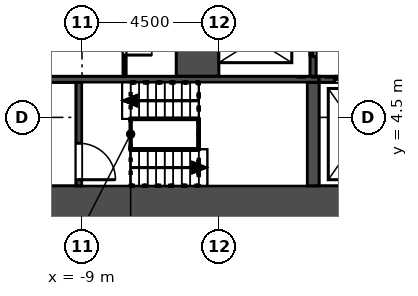
"""IFC4 building model, lengths in metres.
Left out: names, types, materials, properties, quantities, classifications, styles, units other than length and angle.
Written with IfcOpenShell. Run it as: python <this file> out.ifc"""

import sys

from ifc_helpers import new_model, si_unit, direction, frame, frame_2d, origin, place, context, subcontext, project, spatial, rectangle, extrude, element, fill, save


model = new_model("IFC4")
c1 = context("Model", 3, precision=1e-05, world=origin(), true_north=direction((0.0, 1.0)))
c2 = subcontext(c1, "Body", "Model", "MODEL_VIEW")
j1 = project(units=[si_unit("LENGTHUNIT", "METRE"), si_unit("PLANEANGLEUNIT", "RADIAN")], contexts=[c1])
p1 = place(None, origin())
s1 = spatial("IfcSite", under=j1, at=p1, CompositionType="ELEMENT")
p2 = place(p1, origin())
s2 = spatial("IfcBuilding", under=s1, at=p2, CompositionType="ELEMENT")
p3 = place(p2, frame((0.0, 0.0, -14.0)))
s3 = spatial("IfcBuildingStorey", under=s2, at=p3, CompositionType="ELEMENT", Elevation=-14.0)
p4 = place(p3, frame((-14.0, 1.55, 0.0), z_axis=(0.0, 0.0, 1.0), x_axis=(1.0, 0.0, 0.0)))
e1 = element("IfcWall", 1, at=p4, inside=s3, PredefinedType="SHEAR", context=c2, shape_type="SweptSolid", body=[
    extrude(rectangle(XDim=28.0, YDim=1.4, at=frame_2d((14.0, 0.0))), origin(), (0.0, 0.0, 1.0), 6.0),
])
p5 = place(p3, frame((-1.4, 5.85, 0.0), z_axis=(0.0, 0.0, 1.0), x_axis=(0.0, 1.0, 0.0)))
e2 = element("IfcWall", 2, at=p5, inside=s3, PredefinedType="SOLIDWALL", context=c2, shape_type="SweptSolid", body=[
    extrude(rectangle(XDim=11.75, YDim=0.2, at=frame_2d((5.875, 0.0))), origin(), (0.0, 0.0, 1.0), 5.65),
])
p6 = place(p5, frame((0.65, 0.0, 0.0)))
e3 = element("IfcOpeningElement", 3, at=p6, cuts=e2, PredefinedType="OPENING", context=c2, shape_type="SweptSolid", body=[
    extrude(rectangle(XDim=1.1, YDim=2.1, at=frame_2d((0.55, 1.05))), frame((0.0, 0.11, 0.0), z_axis=(0.0, -1.0, 0.0), x_axis=(1.0, 0.0, 0.0)), (0.0, 0.0, 1.0), 0.22),
])
p7 = place(p5, frame((3.3, 0.0, 0.0)))
e4 = element("IfcOpeningElement", 4, at=p7, cuts=e2, PredefinedType="OPENING", context=c2, shape_type="SweptSolid", body=[
    extrude(rectangle(XDim=1.0, YDim=2.1, at=frame_2d((0.5, 1.05))), frame((0.0, 0.11, 0.0), z_axis=(0.0, -1.0, 0.0), x_axis=(1.0, 0.0, 0.0)), (0.0, 0.0, 1.0), 0.22),
])
p8 = place(p5, frame((5.9, 0.0, 0.0)))
e5 = element("IfcOpeningElement", 5, at=p8, cuts=e2, PredefinedType="OPENING", context=c2, shape_type="SweptSolid", body=[
    extrude(rectangle(XDim=1.0, YDim=2.1, at=frame_2d((0.5, 1.05))), frame((0.0, 0.11, 0.0), z_axis=(0.0, -1.0, 0.0), x_axis=(1.0, 0.0, 0.0)), (0.0, 0.0, 1.0), 0.22),
])
p9 = place(p5, frame((8.5, 0.0, 0.0)))
e6 = element("IfcOpeningElement", 6, at=p9, cuts=e2, PredefinedType="OPENING", context=c2, shape_type="SweptSolid", body=[
    extrude(rectangle(XDim=1.0, YDim=2.1, at=frame_2d((0.5, 1.05))), frame((0.0, 0.11, 0.0), z_axis=(0.0, -1.0, 0.0), x_axis=(1.0, 0.0, 0.0)), (0.0, 0.0, 1.0), 0.22),
])
p10 = place(p3, frame((-5.2, 5.85, 0.0), z_axis=(0.0, 0.0, 1.0), x_axis=(0.0, 1.0, 0.0)))
e7 = element("IfcWall", 7, at=p10, inside=s3, PredefinedType="SOLIDWALL", context=c2, shape_type="SweptSolid", body=[
    extrude(rectangle(XDim=2.4, YDim=1.4, at=frame_2d((1.2, 0.0))), origin(), (0.0, 0.0, 1.0), 5.65),
])
p11 = place(p3, frame((-12.6, 5.75, 0.0), z_axis=(0.0, 0.0, 1.0), x_axis=(1.0, 0.0, 0.0)))
e8 = element("IfcWall", 8, at=p11, inside=s3, PredefinedType="SOLIDWALL", context=c2, shape_type="SweptSolid", body=[
    extrude(rectangle(XDim=11.4, YDim=0.2, at=frame_2d((5.7, 0.0))), origin(), (0.0, 0.0, 1.0), 5.65),
])
p12 = place(p3, frame((-1.2, 5.75, 0.0), z_axis=(0.0, 0.0, 1.0), x_axis=(1.0, 0.0, 0.0)))
e9 = element("IfcWall", 9, at=p12, inside=s3, PredefinedType="SOLIDWALL", context=c2, shape_type="SweptSolid", body=[
    extrude(rectangle(XDim=2.4, YDim=0.2, at=frame_2d((1.2, 0.0))), origin(), (0.0, 0.0, 1.0), 5.65),
])
p13 = place(p12, frame((0.5, 0.0, 0.0)))
e10 = element("IfcOpeningElement", 10, at=p13, cuts=e9, PredefinedType="OPENING", context=c2, shape_type="SweptSolid", body=[
    extrude(rectangle(XDim=1.4, YDim=2.1, at=frame_2d((0.7, 1.05))), frame((0.0, 0.11, 0.0), z_axis=(0.0, -1.0, 0.0), x_axis=(1.0, 0.0, 0.0)), (0.0, 0.0, 1.0), 0.22),
])
p14 = place(p3, frame((-9.1, 2.25, 0.0), z_axis=(0.0, 0.0, 1.0), x_axis=(0.0, 1.0, 0.0)))
e11 = element("IfcWall", 11, at=p14, inside=s3, PredefinedType="SOLIDWALL", context=c2, shape_type="SweptSolid", body=[
    extrude(rectangle(XDim=3.4, YDim=0.2, at=frame_2d((1.7, 0.0))), origin(), (0.0, 0.0, 1.0), 5.65),
])
p15 = place(p14, frame((0.2, 0.0, 0.0)))
e12 = element("IfcOpeningElement", 12, at=p15, cuts=e11, PredefinedType="OPENING", context=c2, shape_type="SweptSolid", body=[
    extrude(rectangle(XDim=1.2, YDim=2.1, at=frame_2d((0.6, 1.05))), frame((0.0, 0.11, 0.0), z_axis=(0.0, -1.0, 0.0), x_axis=(1.0, 0.0, 0.0)), (0.0, 0.0, 1.0), 0.22),
])
p16 = place(p3, frame((-1.4, 2.25, 0.0), z_axis=(0.0, 0.0, 1.0), x_axis=(0.0, 1.0, 0.0)))
e13 = element("IfcWall", 13, at=p16, inside=s3, PredefinedType="SOLIDWALL", context=c2, shape_type="SweptSolid", body=[
    extrude(rectangle(XDim=3.4, YDim=0.4, at=frame_2d((1.7, 0.0))), origin(), (0.0, 0.0, 1.0), 5.65),
])
p17 = place(p3, frame((-7.6, 5.85, 0.0), z_axis=(0.0, 0.0, 1.0), x_axis=(0.0, 1.0, 0.0)))
e14 = element("IfcWall", 14, at=p17, inside=s3, PredefinedType="PARTITIONING", context=c2, shape_type="SweptSolid", body=[
    extrude(rectangle(XDim=2.4, YDim=0.1, at=frame_2d((1.2, 0.0))), origin(), (0.0, 0.0, 1.0), 5.65),
])
p18 = place(p17, frame((0.7, 0.0, 0.0)))
e15 = element("IfcOpeningElement", 15, at=p18, cuts=e14, PredefinedType="OPENING", context=c2, shape_type="SweptSolid", body=[
    extrude(rectangle(XDim=0.9, YDim=2.1, at=frame_2d((0.45, 1.05))), frame((0.0, 0.06, 0.0), z_axis=(0.0, -1.0, 0.0), x_axis=(1.0, 0.0, 0.0)), (0.0, 0.0, 1.0), 0.12),
])
p19 = place(p6, origin())
e16 = element("IfcDoor", 16, at=p19, inside=s3, OperationType="SLIDING_TO_RIGHT", PredefinedType="DOOR", context=c2, shape_type="SweptSolid", body=[
    extrude(rectangle(XDim=1.1, YDim=2.1, at=frame_2d((0.55, 1.05))), frame((0.0, 0.025, 0.0), z_axis=(0.0, -1.0, 0.0), x_axis=(1.0, 0.0, 0.0)), (0.0, 0.0, 1.0), 0.05),
])
fill(e3, e16)
p20 = place(p13, origin())
e17 = element("IfcDoor", 17, at=p20, inside=s3, OperationType="SLIDING_TO_LEFT", PredefinedType="DOOR", context=c2, shape_type="SweptSolid", body=[
    extrude(rectangle(XDim=1.4, YDim=2.1, at=frame_2d((0.7, 1.05))), frame((0.0, 0.025, 0.0), z_axis=(0.0, -1.0, 0.0), x_axis=(1.0, 0.0, 0.0)), (0.0, 0.0, 1.0), 0.05),
])
fill(e10, e17)
p21 = place(p18, frame((0.9, 0.0, 0.0), z_axis=(0.0, 0.0, 1.0), x_axis=(-1.0, 0.0, 0.0)))
e18 = element("IfcDoor", 18, at=p21, inside=s3, OperationType="SINGLE_SWING_RIGHT", PredefinedType="DOOR", context=c2, shape_type="SweptSolid", body=[
    extrude(rectangle(XDim=0.9, YDim=2.1, at=frame_2d((0.45, 1.05))), frame((0.0, 0.025, 0.0), z_axis=(0.0, -1.0, 0.0), x_axis=(1.0, 0.0, 0.0)), (0.0, 0.0, 1.0), 0.05),
])
fill(e15, e18)
p22 = place(p15, frame((1.2, 0.0, 0.0), z_axis=(0.0, 0.0, 1.0), x_axis=(-1.0, 0.0, 0.0)))
e19 = element("IfcDoor", 19, at=p22, inside=s3, OperationType="SINGLE_SWING_RIGHT", PredefinedType="DOOR", context=c2, shape_type="SweptSolid", body=[
    extrude(rectangle(XDim=1.2, YDim=2.1, at=frame_2d((0.6, 1.05))), frame((0.0, 0.025, 0.0), z_axis=(0.0, -1.0, 0.0), x_axis=(1.0, 0.0, 0.0)), (0.0, 0.0, 1.0), 0.05),
])
fill(e12, e19)
save(model, sys.argv[1])
